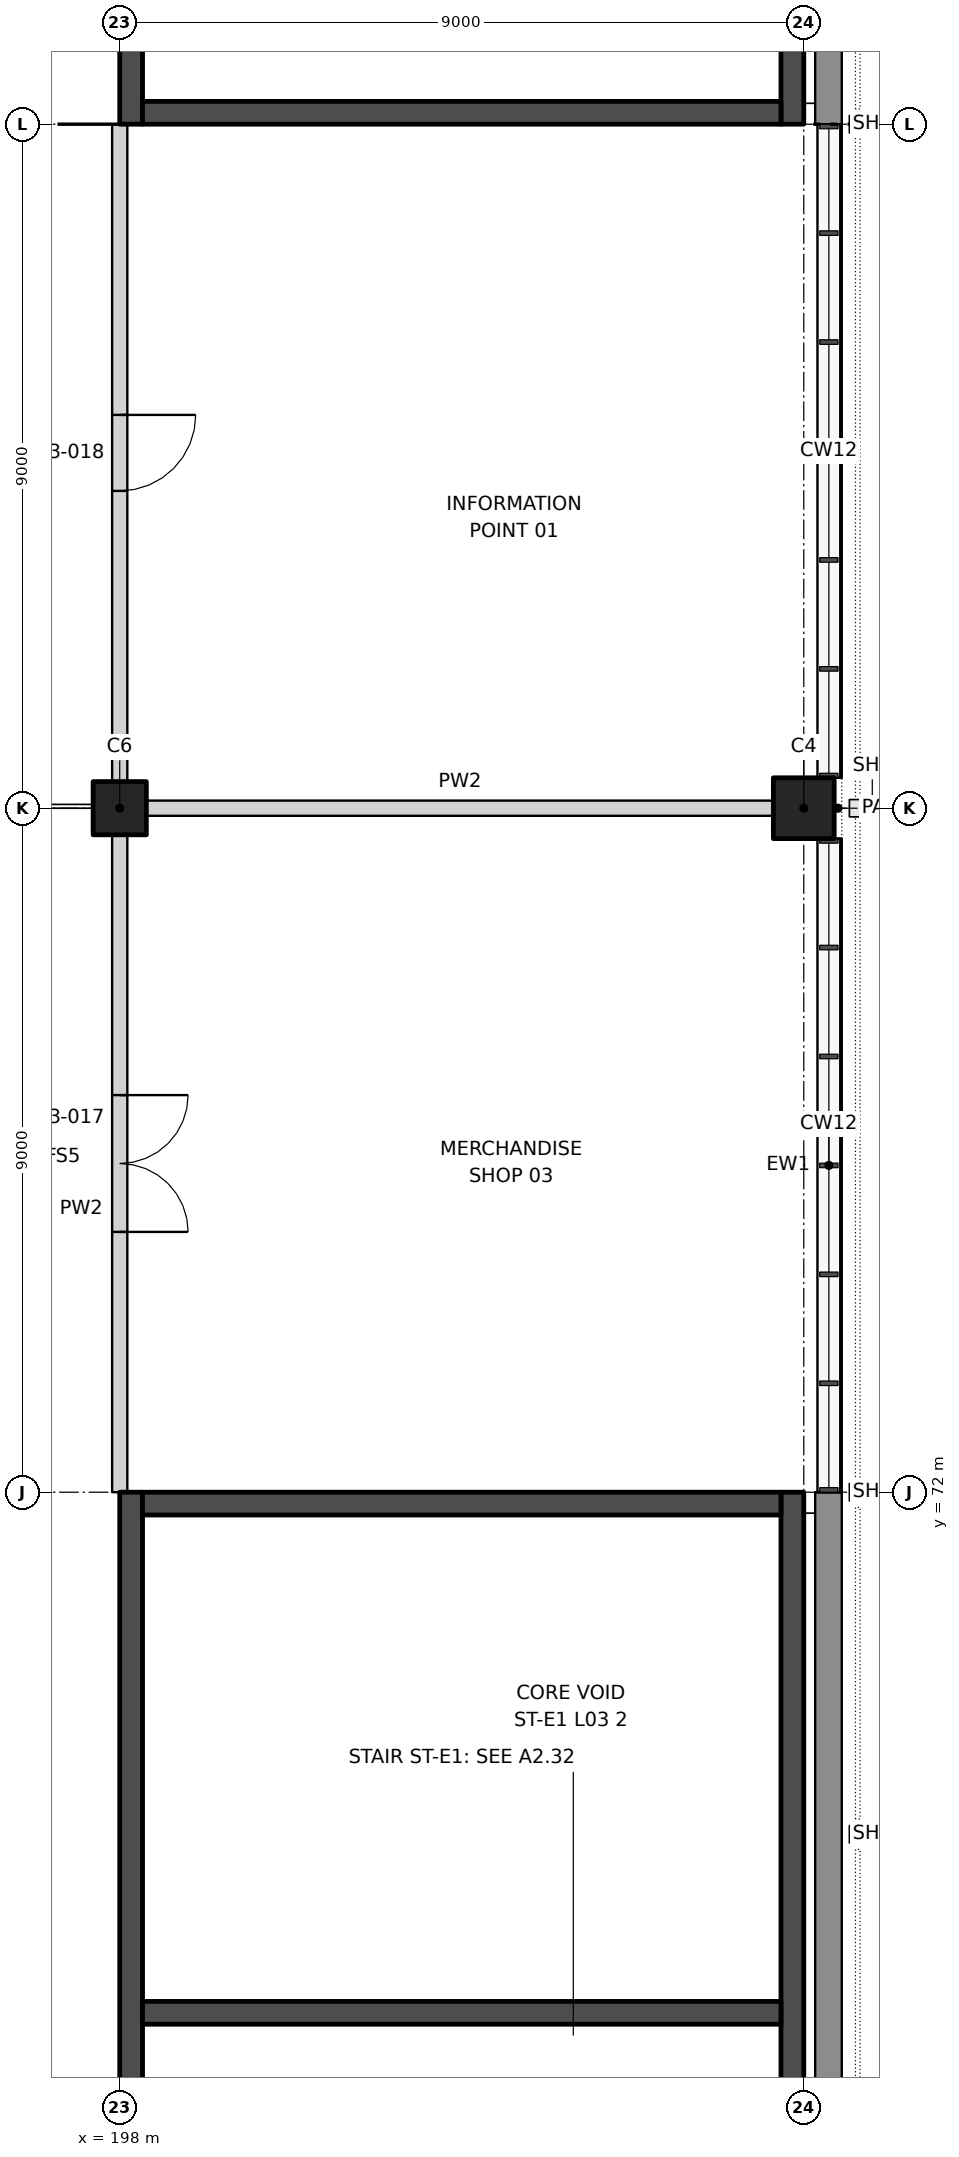
"""IFC4 building model, lengths in metres.
Left out: names, types, materials, properties, quantities, classifications, styles, units other than length and angle.
Written with IfcOpenShell. Run it as: python <this file> out.ifc"""

import sys

from ifc_helpers import new_model, si_unit, direction, frame, frame_2d, origin, origin_2d, place, context, subcontext, project, spatial, rectangle, extrude, element, fill, save


model = new_model("IFC4")
c1 = context("Model", 3, precision=1e-05, world=origin(), true_north=direction((0.0, 1.0)))
c2 = subcontext(c1, "Body", "Model", "MODEL_VIEW")
j1 = project(units=[si_unit("LENGTHUNIT", "METRE"), si_unit("PLANEANGLEUNIT", "RADIAN")], contexts=[c1])
p1 = place(None, origin())
s1 = spatial("IfcSite", under=j1, at=p1, CompositionType="ELEMENT")
p2 = place(p1, origin())
s2 = spatial("IfcBuilding", under=s1, at=p2, CompositionType="ELEMENT")
p3 = place(p2, frame((0.0, 0.0, 22.0)))
s3 = spatial("IfcBuildingStorey", under=s2, at=p3, CompositionType="ELEMENT", Elevation=22.0)
p4 = place(p3, frame((207.0, 81.0, 0.0), z_axis=(0.0, 0.0, 1.0), x_axis=(1.0, 0.0, 0.0)))
e1 = element("IfcColumn", 1, at=p4, inside=s3, PredefinedType="COLUMN", context=c2, shape_type="SweptSolid", body=[
    extrude(rectangle(XDim=0.8, YDim=0.8, at=origin_2d()), origin(), (0.0, 0.0, 1.0), 6.0),
])
p5 = place(p3, frame((198.0, 81.0, 0.0), z_axis=(0.0, 0.0, 1.0), x_axis=(1.0, 0.0, 0.0)))
e2 = element("IfcColumn", 2, at=p5, inside=s3, PredefinedType="COLUMN", context=c2, shape_type="SweptSolid", body=[
    extrude(rectangle(XDim=0.7, YDim=0.7, at=origin_2d()), origin(), (0.0, 0.0, 1.0), 6.0),
])
p6 = place(p3, frame((198.35, 81.0, 0.0), z_axis=(0.0, 0.0, 1.0), x_axis=(1.0, 0.0, 0.0)))
e3 = element("IfcWall", 3, at=p6, inside=s3, PredefinedType="PARTITIONING", context=c2, shape_type="SweptSolid", body=[
    extrude(rectangle(XDim=8.25, YDim=0.2, at=frame_2d((4.125, 0.0))), origin(), (0.0, 0.0, 1.0), 4.8),
])
p7 = place(p3, frame((198.0, 72.0, 0.0), z_axis=(0.0, 0.0, 1.0), x_axis=(0.0, 1.0, 0.0)))
e4 = element("IfcWall", 4, at=p7, inside=s3, PredefinedType="PARTITIONING", context=c2, shape_type="SweptSolid", body=[
    extrude(rectangle(XDim=8.65, YDim=0.2, at=frame_2d((4.325, 0.0))), origin(), (0.0, 0.0, 1.0), 4.7),
])
p8 = place(p7, frame((3.425, 0.0, 0.0)))
e5 = element("IfcOpeningElement", 5, at=p8, cuts=e4, PredefinedType="OPENING", context=c2, shape_type="SweptSolid", body=[
    extrude(rectangle(XDim=1.8, YDim=2.1, at=frame_2d((0.9, 1.05))), frame((0.0, 0.11, 0.0), z_axis=(0.0, -1.0, 0.0), x_axis=(1.0, 0.0, 0.0)), (0.0, 0.0, 1.0), 0.22),
])
p9 = place(p3, frame((198.0, 81.35, 0.0), z_axis=(0.0, 0.0, 1.0), x_axis=(0.0, 1.0, 0.0)))
e6 = element("IfcWall", 6, at=p9, inside=s3, PredefinedType="PARTITIONING", context=c2, shape_type="SweptSolid", body=[
    extrude(rectangle(XDim=8.65, YDim=0.2, at=frame_2d((4.325, 0.0))), origin(), (0.0, 0.0, 1.0), 4.7),
])
p10 = place(p9, frame((3.825, 0.0, 0.0)))
e7 = element("IfcOpeningElement", 7, at=p10, cuts=e6, PredefinedType="OPENING", context=c2, shape_type="SweptSolid", body=[
    extrude(rectangle(XDim=1.0, YDim=2.1, at=frame_2d((0.5, 1.05))), frame((0.0, 0.11, 0.0), z_axis=(0.0, -1.0, 0.0), x_axis=(1.0, 0.0, 0.0)), (0.0, 0.0, 1.0), 0.22),
])
p11 = place(p3, frame((207.325, 63.0, 0.0), z_axis=(0.0, 0.0, 1.0), x_axis=(0.0, 1.0, 0.0)))
e8 = element("IfcWall", 8, at=p11, inside=s3, PredefinedType="SOLIDWALL", context=c2, shape_type="SweptSolid", body=[
    extrude(rectangle(XDim=9.0, YDim=0.35, at=frame_2d((4.5, 0.0))), origin(), (0.0, 0.0, 1.0), 6.0),
])
for number, where, z_axis, x_axis in (
    (9, (207.35, 72.0, 0.0), (0.0, 0.0, 1.0), (0.0, 1.0, 0.0)),
    (10, (207.35, 81.4, 0.0), (0.0, 0.0, 1.0), (0.0, 1.0, 0.0)),
):
    element("IfcWall", number, at=place(p3, frame(where, z_axis=z_axis, x_axis=x_axis)), inside=s3, PredefinedType="SOLIDWALL", context=c2, shape_type="SweptSolid", body=[
        extrude(rectangle(XDim=8.6, YDim=0.3, at=frame_2d((4.3, 0.0))), origin(), (0.0, 0.0, 1.0), 1.0),
    ])
p12 = place(p3, frame((207.325, 90.0, 0.0), z_axis=(0.0, 0.0, 1.0), x_axis=(0.0, 1.0, 0.0)))
e11 = element("IfcWall", 11, at=p12, inside=s3, PredefinedType="SOLIDWALL", context=c2, shape_type="SweptSolid", body=[
    extrude(rectangle(XDim=9.0, YDim=0.35, at=frame_2d((4.5, 0.0))), origin(), (0.0, 0.0, 1.0), 6.0),
])
p13 = place(p3, frame((198.15, 54.0, 0.0), z_axis=(0.0, 0.0, 1.0), x_axis=(0.0, 1.0, 0.0)))
e12 = element("IfcWall", 12, at=p13, inside=s3, PredefinedType="SHEAR", context=c2, shape_type="SweptSolid", body=[
    extrude(rectangle(XDim=18.0, YDim=0.3, at=frame_2d((9.0, 0.0))), origin(), (0.0, 0.0, 1.0), 6.0),
])
p14 = place(p13, frame((8.6, 0.0, 0.0)))
e13 = element("IfcOpeningElement", 13, at=p14, cuts=e12, PredefinedType="OPENING", context=c2, shape_type="SweptSolid", body=[
    extrude(rectangle(XDim=1.2, YDim=2.1, at=frame_2d((0.6, 1.05))), frame((0.0, 0.16, 0.0), z_axis=(0.0, -1.0, 0.0), x_axis=(1.0, 0.0, 0.0)), (0.0, 0.0, 1.0), 0.32),
])
p15 = place(p3, frame((206.85, 54.0, 0.0), z_axis=(0.0, 0.0, 1.0), x_axis=(0.0, 1.0, 0.0)))
e14 = element("IfcWall", 14, at=p15, inside=s3, PredefinedType="SHEAR", context=c2, shape_type="SweptSolid", body=[
    extrude(rectangle(XDim=18.0, YDim=0.3, at=frame_2d((9.0, 0.0))), origin(), (0.0, 0.0, 1.0), 6.0),
])
for number, where, z_axis, x_axis in (
    (15, (198.3, 71.85, 0.0), (0.0, 0.0, 1.0), (1.0, 0.0, 0.0)),
    (16, (198.3, 65.15, 0.0), (0.0, 0.0, 1.0), (1.0, 0.0, 0.0)),
):
    element("IfcWall", number, at=place(p3, frame(where, z_axis=z_axis, x_axis=x_axis)), inside=s3, PredefinedType="SHEAR", context=c2, shape_type="SweptSolid", body=[
        extrude(rectangle(XDim=8.4, YDim=0.3, at=frame_2d((4.2, 0.0))), origin(), (0.0, 0.0, 1.0), 6.0),
    ])
p16 = place(p3, frame((198.15, 108.0, 0.0), z_axis=(0.0, 0.0, 1.0), x_axis=(0.0, -1.0, 0.0)))
e17 = element("IfcWall", 17, at=p16, inside=s3, PredefinedType="SHEAR", context=c2, shape_type="SweptSolid", body=[
    extrude(rectangle(XDim=18.0, YDim=0.3, at=frame_2d((9.0, 0.0))), origin(), (0.0, 0.0, 1.0), 6.0),
])
p17 = place(p16, frame((8.6, 0.0, 0.0)))
e18 = element("IfcOpeningElement", 18, at=p17, cuts=e17, PredefinedType="OPENING", context=c2, shape_type="SweptSolid", body=[
    extrude(rectangle(XDim=1.2, YDim=2.1, at=frame_2d((0.6, 1.05))), frame((0.0, 0.16, 0.0), z_axis=(0.0, -1.0, 0.0), x_axis=(1.0, 0.0, 0.0)), (0.0, 0.0, 1.0), 0.32),
])
p18 = place(p3, frame((206.85, 108.0, 0.0), z_axis=(0.0, 0.0, 1.0), x_axis=(0.0, -1.0, 0.0)))
e19 = element("IfcWall", 19, at=p18, inside=s3, PredefinedType="SHEAR", context=c2, shape_type="SweptSolid", body=[
    extrude(rectangle(XDim=18.0, YDim=0.3, at=frame_2d((9.0, 0.0))), origin(), (0.0, 0.0, 1.0), 6.0),
])
p19 = place(p3, frame((198.3, 90.15, 0.0), z_axis=(0.0, 0.0, 1.0), x_axis=(1.0, 0.0, 0.0)))
e20 = element("IfcWall", 20, at=p19, inside=s3, PredefinedType="SHEAR", context=c2, shape_type="SweptSolid", body=[
    extrude(rectangle(XDim=8.4, YDim=0.3, at=frame_2d((4.2, 0.0))), origin(), (0.0, 0.0, 1.0), 6.0),
])
p20 = place(p8, frame((1.8, 0.0, 0.0), z_axis=(0.0, 0.0, 1.0), x_axis=(-1.0, 0.0, 0.0)))
e21 = element("IfcDoor", 21, at=p20, inside=s3, OperationType="DOUBLE_DOOR_DOUBLE_SWING", PredefinedType="DOOR", context=c2, shape_type="SweptSolid", body=[
    extrude(rectangle(XDim=1.8, YDim=2.1, at=frame_2d((0.9, 1.05))), frame((0.0, 0.025, 0.0), z_axis=(0.0, -1.0, 0.0), x_axis=(1.0, 0.0, 0.0)), (0.0, 0.0, 1.0), 0.05),
])
fill(e5, e21)
p21 = place(p10, frame((1.0, 0.0, 0.0), z_axis=(0.0, 0.0, 1.0), x_axis=(-1.0, 0.0, 0.0)))
e22 = element("IfcDoor", 22, at=p21, inside=s3, OperationType="SINGLE_SWING_LEFT", PredefinedType="DOOR", context=c2, shape_type="SweptSolid", body=[
    extrude(rectangle(XDim=1.0, YDim=2.1, at=frame_2d((0.5, 1.05))), frame((0.0, 0.025, 0.0), z_axis=(0.0, -1.0, 0.0), x_axis=(1.0, 0.0, 0.0)), (0.0, 0.0, 1.0), 0.05),
])
fill(e7, e22)
save(model, sys.argv[1])
